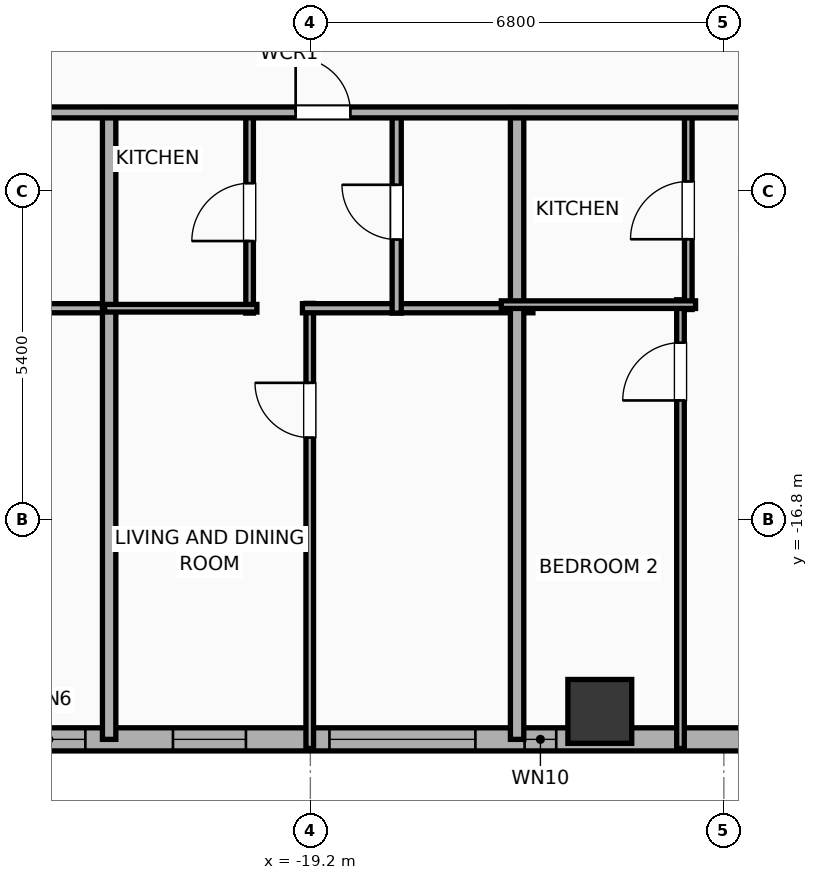
"""IFC4 building model, lengths in metres.
Left out: names, types, materials, properties, quantities, classifications, styles, units other than length and angle.
Written with IfcOpenShell. Run it as: python <this file> out.ifc"""

import sys

from ifc_helpers import new_model, si_unit, direction, frame, frame_2d, origin, origin_2d, place, context, subcontext, project, spatial, rectangle, hollow_rectangle, extrude, element, fill, save


model = new_model("IFC4")
c1 = context("Model", 3, precision=1e-05, world=origin(), true_north=direction((0.0, 1.0)))
c2 = subcontext(c1, "Body", "Model", "MODEL_VIEW")
j1 = project(units=[si_unit("LENGTHUNIT", "METRE"), si_unit("PLANEANGLEUNIT", "RADIAN")], contexts=[c1])
p1 = place(None, origin())
s1 = spatial("IfcSite", under=j1, at=p1, CompositionType="ELEMENT")
p2 = place(p1, origin())
s2 = spatial("IfcBuilding", under=s1, at=p2, CompositionType="ELEMENT")
p3 = place(p2, frame((0.0, 0.0, 101.4)))
s3 = spatial("IfcBuildingStorey", under=s2, at=p3, CompositionType="ELEMENT", Elevation=101.4)
p4 = place(p3, frame((-14.44, -19.95, 0.0), z_axis=(0.0, 0.0, 1.0), x_axis=(1.0, 0.0, 0.0)))
e1 = element("IfcColumn", 1, at=p4, inside=s3, PredefinedType="COLUMN", context=c2, shape_type="SweptSolid", body=[
    extrude(hollow_rectangle(XDim=1.05, YDim=1.05, WallThickness=0.036, at=origin_2d()), origin(), (0.0, 0.0, 1.0), 3.9),
])
p5 = place(p3, frame((29.381, -20.41, 0.0), z_axis=(0.0, 0.0, 1.0), x_axis=(-1.0, 0.0, 0.0)))
e2 = element("IfcWall", 2, at=p5, inside=s3, PredefinedType="ELEMENTEDWALL", context=c2, shape_type="SweptSolid", body=[
    extrude(rectangle(XDim=54.763, YDim=0.38, at=frame_2d((27.381, 0.0))), origin(), (0.0, 0.0, 1.0), 3.65),
])
p6 = place(p5, frame((6.495, 0.0, 0.75)))
e3 = element("IfcOpeningElement", 3, at=p6, cuts=e2, PredefinedType="OPENING", context=c2, shape_type="SweptSolid", body=[
    extrude(rectangle(XDim=2.4, YDim=2.1, at=frame_2d((1.2, 1.05))), frame((0.0, 0.2, 0.0), z_axis=(0.0, -1.0, 0.0), x_axis=(1.0, 0.0, 0.0)), (0.0, 0.0, 1.0), 0.4),
])
p7 = place(p5, frame((17.686, 0.0, 0.75)))
e4 = element("IfcOpeningElement", 4, at=p7, cuts=e2, PredefinedType="OPENING", context=c2, shape_type="SweptSolid", body=[
    extrude(rectangle(XDim=2.4, YDim=2.1, at=frame_2d((1.2, 1.05))), frame((0.0, 0.2, 0.0), z_axis=(0.0, -1.0, 0.0), x_axis=(1.0, 0.0, 0.0)), (0.0, 0.0, 1.0), 0.4),
])
p8 = place(p5, frame((34.677, 0.0, 0.75)))
e5 = element("IfcOpeningElement", 5, at=p8, cuts=e2, PredefinedType="OPENING", context=c2, shape_type="SweptSolid", body=[
    extrude(rectangle(XDim=2.4, YDim=2.1, at=frame_2d((1.2, 1.05))), frame((0.0, 0.2, 0.0), z_axis=(0.0, -1.0, 0.0), x_axis=(1.0, 0.0, 0.0)), (0.0, 0.0, 1.0), 0.4),
])
p9 = place(p5, frame((45.867, 0.0, 0.75)))
e6 = element("IfcOpeningElement", 6, at=p9, cuts=e2, PredefinedType="OPENING", context=c2, shape_type="SweptSolid", body=[
    extrude(rectangle(XDim=2.4, YDim=2.1, at=frame_2d((1.2, 1.05))), frame((0.0, 0.2, 0.0), z_axis=(0.0, -1.0, 0.0), x_axis=(1.0, 0.0, 0.0)), (0.0, 0.0, 1.0), 0.4),
])
p10 = place(p5, frame((52.281, 0.0, 0.75)))
e7 = element("IfcOpeningElement", 7, at=p10, cuts=e2, PredefinedType="OPENING", context=c2, shape_type="SweptSolid", body=[
    extrude(rectangle(XDim=1.2, YDim=2.05, at=frame_2d((0.6, 1.025))), frame((0.0, 0.2, 0.0), z_axis=(0.0, -1.0, 0.0), x_axis=(1.0, 0.0, 0.0)), (0.0, 0.0, 1.0), 0.4),
])
p11 = place(p5, frame((49.641, 0.0, 0.75)))
e8 = element("IfcOpeningElement", 8, at=p11, cuts=e2, PredefinedType="OPENING", context=c2, shape_type="SweptSolid", body=[
    extrude(rectangle(XDim=1.2, YDim=2.05, at=frame_2d((0.6, 1.025))), frame((0.0, 0.2, 0.0), z_axis=(0.0, -1.0, 0.0), x_axis=(1.0, 0.0, 0.0)), (0.0, 0.0, 1.0), 0.4),
])
p12 = place(p5, frame((39.543, 0.0, 0.75)))
e9 = element("IfcOpeningElement", 9, at=p12, cuts=e2, PredefinedType="OPENING", context=c2, shape_type="SweptSolid", body=[
    extrude(rectangle(XDim=1.2, YDim=2.05, at=frame_2d((0.6, 1.025))), frame((0.0, 0.2, 0.0), z_axis=(0.0, -1.0, 0.0), x_axis=(1.0, 0.0, 0.0)), (0.0, 0.0, 1.0), 0.4),
])
p13 = place(p5, frame((44.538, 0.0, 0.75)))
e10 = element("IfcOpeningElement", 10, at=p13, cuts=e2, PredefinedType="OPENING", context=c2, shape_type="SweptSolid", body=[
    extrude(rectangle(XDim=0.52, YDim=2.05, at=frame_2d((0.26, 1.025))), frame((0.0, 0.2, 0.0), z_axis=(0.0, -1.0, 0.0), x_axis=(1.0, 0.0, 0.0)), (0.0, 0.0, 1.0), 0.4),
])
p14 = place(p5, frame((28.206, 0.0, 0.75)))
e11 = element("IfcOpeningElement", 11, at=p14, cuts=e2, PredefinedType="OPENING", context=c2, shape_type="SweptSolid", body=[
    extrude(rectangle(XDim=1.2, YDim=2.05, at=frame_2d((0.6, 1.025))), frame((0.0, 0.2, 0.0), z_axis=(0.0, -1.0, 0.0), x_axis=(1.0, 0.0, 0.0)), (0.0, 0.0, 1.0), 0.4),
])
p15 = place(p5, frame((31.241, 0.0, 0.75)))
e12 = element("IfcOpeningElement", 12, at=p15, cuts=e2, PredefinedType="OPENING", context=c2, shape_type="SweptSolid", body=[
    extrude(rectangle(XDim=0.85, YDim=2.05, at=frame_2d((0.425, 1.025))), frame((0.0, 0.2, 0.0), z_axis=(0.0, -1.0, 0.0), x_axis=(1.0, 0.0, 0.0)), (0.0, 0.0, 1.0), 0.4),
])
p16 = place(p5, frame((24.561, 0.0, 0.75)))
e13 = element("IfcOpeningElement", 13, at=p16, cuts=e2, PredefinedType="OPENING", context=c2, shape_type="SweptSolid", body=[
    extrude(rectangle(XDim=1.2, YDim=2.05, at=frame_2d((0.6, 1.025))), frame((0.0, 0.2, 0.0), z_axis=(0.0, -1.0, 0.0), x_axis=(1.0, 0.0, 0.0)), (0.0, 0.0, 1.0), 0.4),
])
p17 = place(p5, frame((22.561, 0.0, 0.75)))
e14 = element("IfcOpeningElement", 14, at=p17, cuts=e2, PredefinedType="OPENING", context=c2, shape_type="SweptSolid", body=[
    extrude(rectangle(XDim=0.52, YDim=2.05, at=frame_2d((0.26, 1.025))), frame((0.0, 0.2, 0.0), z_axis=(0.0, -1.0, 0.0), x_axis=(1.0, 0.0, 0.0)), (0.0, 0.0, 1.0), 0.4),
])
p18 = place(p5, frame((13.886, 0.0, 0.75)))
e15 = element("IfcOpeningElement", 15, at=p18, cuts=e2, PredefinedType="OPENING", context=c2, shape_type="SweptSolid", body=[
    extrude(rectangle(XDim=1.2, YDim=2.05, at=frame_2d((0.6, 1.025))), frame((0.0, 0.2, 0.0), z_axis=(0.0, -1.0, 0.0), x_axis=(1.0, 0.0, 0.0)), (0.0, 0.0, 1.0), 0.4),
])
p19 = place(p5, frame((11.694, 0.0, 0.75)))
e16 = element("IfcOpeningElement", 16, at=p19, cuts=e2, PredefinedType="OPENING", context=c2, shape_type="SweptSolid", body=[
    extrude(rectangle(XDim=0.85, YDim=2.05, at=frame_2d((0.425, 1.025))), frame((0.0, 0.2, 0.0), z_axis=(0.0, -1.0, 0.0), x_axis=(1.0, 0.0, 0.0)), (0.0, 0.0, 1.0), 0.4),
])
p20 = place(p5, frame((3.286, 0.0, 0.75)))
e17 = element("IfcOpeningElement", 17, at=p20, cuts=e2, PredefinedType="OPENING", context=c2, shape_type="SweptSolid", body=[
    extrude(rectangle(XDim=1.2, YDim=2.05, at=frame_2d((0.6, 1.025))), frame((0.0, 0.2, 0.0), z_axis=(0.0, -1.0, 0.0), x_axis=(1.0, 0.0, 0.0)), (0.0, 0.0, 1.0), 0.4),
])
p21 = place(p5, frame((0.816, 0.0, 0.75)))
e18 = element("IfcOpeningElement", 18, at=p21, cuts=e2, PredefinedType="OPENING", context=c2, shape_type="SweptSolid", body=[
    extrude(rectangle(XDim=1.2, YDim=2.05, at=frame_2d((0.6, 1.025))), frame((0.0, 0.2, 0.0), z_axis=(0.0, -1.0, 0.0), x_axis=(1.0, 0.0, 0.0)), (0.0, 0.0, 1.0), 0.4),
])
p22 = place(p3, frame((-26.039, -13.32, 0.0), z_axis=(0.0, 0.0, 1.0), x_axis=(1.0, 0.0, 0.0)))
e19 = element("IfcWall", 19, at=p22, inside=s3, PredefinedType="PLUMBINGWALL", context=c2, shape_type="SweptSolid", body=[
    extrude(rectangle(XDim=3.605, YDim=0.15, at=frame_2d((1.802, 0.0))), origin(), (0.0, 0.0, 1.0), 3.65),
])
p23 = place(p3, frame((-22.509, -20.41, 0.0), z_axis=(0.0, 0.0, 1.0), x_axis=(0.0, 1.0, 0.0)))
e20 = element("IfcWall", 20, at=p23, inside=s3, PredefinedType="PARTITIONING", context=c2, shape_type="SweptSolid", body=[
    extrude(rectangle(XDim=10.39, YDim=0.22, at=frame_2d((5.195, 0.0))), origin(), (0.0, 0.0, 1.0), 3.65),
])
p24 = place(p3, frame((-19.21, -20.56, 0.0), z_axis=(0.0, 0.0, 1.0), x_axis=(0.0, 1.0, 0.0)))
e21 = element("IfcWall", 21, at=p24, inside=s3, PredefinedType="PARTITIONING", context=c2, shape_type="SweptSolid", body=[
    extrude(rectangle(XDim=7.32, YDim=0.125, at=frame_2d((3.66, 0.0))), origin(), (0.0, 0.0, 1.0), 3.65),
])
p25 = place(p24, frame((5.113, 0.0, 0.0)))
e22 = element("IfcOpeningElement", 22, at=p25, cuts=e21, PredefinedType="OPENING", context=c2, shape_type="SweptSolid", body=[
    extrude(rectangle(XDim=0.9, YDim=2.05, at=frame_2d((0.45, 1.025))), frame((0.0, 0.073, 0.0), z_axis=(0.0, -1.0, 0.0), x_axis=(1.0, 0.0, 0.0)), (0.0, 0.0, 1.0), 0.145),
])
p26 = place(p3, frame((-19.33, -13.32, 0.0), z_axis=(0.0, 0.0, 1.0), x_axis=(1.0, 0.0, 0.0)))
e23 = element("IfcWall", 23, at=p26, inside=s3, PredefinedType="PLUMBINGWALL", context=c2, shape_type="SweptSolid", body=[
    extrude(rectangle(XDim=3.79, YDim=0.15, at=frame_2d((1.895, 0.0))), origin(), (0.0, 0.0, 1.0), 3.65),
])
p27 = place(p3, frame((-20.199, -13.4, 0.0), z_axis=(0.0, 0.0, 1.0), x_axis=(0.0, 1.0, 0.0)))
e24 = element("IfcWall", 24, at=p27, inside=s3, PredefinedType="PARTITIONING", context=c2, shape_type="SweptSolid", body=[
    extrude(rectangle(XDim=3.32, YDim=0.125, at=frame_2d((1.66, 0.0))), origin(), (0.0, 0.0, 1.0), 3.65),
])
p28 = place(p27, frame((1.185, 0.0, 0.0)))
e25 = element("IfcOpeningElement", 25, at=p28, cuts=e24, PredefinedType="OPENING", context=c2, shape_type="SweptSolid", body=[
    extrude(rectangle(XDim=0.95, YDim=2.05, at=frame_2d((0.475, 1.025))), frame((0.0, 0.073, 0.0), z_axis=(0.0, -1.0, 0.0), x_axis=(1.0, 0.0, 0.0)), (0.0, 0.0, 1.0), 0.145),
])
p29 = place(p3, frame((-22.584, -13.32, 0.0), z_axis=(0.0, 0.0, 1.0), x_axis=(1.0, 0.0, 0.0)))
e26 = element("IfcWall", 26, at=p29, inside=s3, PredefinedType="PARTITIONING", context=c2, shape_type="SweptSolid", body=[
    extrude(rectangle(XDim=2.505, YDim=0.125, at=frame_2d((1.252, 0.0))), origin(), (0.0, 0.0, 1.0), 3.65),
])
p30 = place(p3, frame((-17.78, -13.4, 0.0), z_axis=(0.0, 0.0, 1.0), x_axis=(0.0, 1.0, 0.0)))
e27 = element("IfcWall", 27, at=p30, inside=s3, PredefinedType="PLUMBINGWALL", context=c2, shape_type="SweptSolid", body=[
    extrude(rectangle(XDim=3.32, YDim=0.15, at=frame_2d((1.66, 0.0))), origin(), (0.0, 0.0, 1.0), 3.65),
])
p31 = place(p30, frame((1.21, 0.0, 0.0)))
e28 = element("IfcOpeningElement", 28, at=p31, cuts=e27, PredefinedType="OPENING", context=c2, shape_type="SweptSolid", body=[
    extrude(rectangle(XDim=0.9, YDim=2.05, at=frame_2d((0.45, 1.025))), frame((0.0, 0.085, 0.0), z_axis=(0.0, -1.0, 0.0), x_axis=(1.0, 0.0, 0.0)), (0.0, 0.0, 1.0), 0.17),
])
p32 = place(p3, frame((-15.8, -20.41, 0.0), z_axis=(0.0, 0.0, 1.0), x_axis=(0.0, 1.0, 0.0)))
e29 = element("IfcWall", 29, at=p32, inside=s3, PredefinedType="PARTITIONING", context=c2, shape_type="SweptSolid", body=[
    extrude(rectangle(XDim=10.39, YDim=0.22, at=frame_2d((5.195, 0.0))), origin(), (0.0, 0.0, 1.0), 3.65),
])
p33 = place(p3, frame((-13.113, -20.56, 0.0), z_axis=(0.0, 0.0, 1.0), x_axis=(0.0, 1.0, 0.0)))
e30 = element("IfcWall", 30, at=p33, inside=s3, PredefinedType="PARTITIONING", context=c2, shape_type="SweptSolid", body=[
    extrude(rectangle(XDim=7.379, YDim=0.125, at=frame_2d((3.689, 0.0))), origin(), (0.0, 0.0, 1.0), 3.65),
])
p34 = place(p33, frame((5.723, 0.0, 0.0)))
e31 = element("IfcOpeningElement", 31, at=p34, cuts=e30, PredefinedType="OPENING", context=c2, shape_type="SweptSolid", body=[
    extrude(rectangle(XDim=0.95, YDim=2.05, at=frame_2d((0.475, 1.025))), frame((0.0, 0.073, 0.0), z_axis=(0.0, -1.0, 0.0), x_axis=(1.0, 0.0, 0.0)), (0.0, 0.0, 1.0), 0.145),
])
p35 = place(p3, frame((-12.985, -13.341, 0.0), z_axis=(0.0, 0.0, 1.0), x_axis=(0.0, 1.0, 0.0)))
e32 = element("IfcWall", 32, at=p35, inside=s3, PredefinedType="PARTITIONING", context=c2, shape_type="SweptSolid", body=[
    extrude(rectangle(XDim=3.261, YDim=0.125, at=frame_2d((1.63, 0.0))), origin(), (0.0, 0.0, 1.0), 3.65),
])
p36 = place(p35, frame((1.156, 0.0, 0.0)))
e33 = element("IfcOpeningElement", 33, at=p36, cuts=e32, PredefinedType="OPENING", context=c2, shape_type="SweptSolid", body=[
    extrude(rectangle(XDim=0.95, YDim=2.05, at=frame_2d((0.475, 1.025))), frame((0.0, 0.073, 0.0), z_axis=(0.0, -1.0, 0.0), x_axis=(1.0, 0.0, 0.0)), (0.0, 0.0, 1.0), 0.145),
])
p37 = place(p3, frame((-16.06, -13.261, 0.0), z_axis=(0.0, 0.0, 1.0), x_axis=(1.0, 0.0, 0.0)))
e34 = element("IfcWall", 34, at=p37, inside=s3, PredefinedType="PARTITIONING", context=c2, shape_type="SweptSolid", body=[
    extrude(rectangle(XDim=3.195, YDim=0.125, at=frame_2d((1.598, 0.0))), origin(), (0.0, 0.0, 1.0), 3.65),
])
p38 = place(p3, frame((-29.21, -10.1, 0.0), z_axis=(0.0, 0.0, 1.0), x_axis=(1.0, 0.0, 0.0)))
e35 = element("IfcWall", 35, at=p38, inside=s3, PredefinedType="PARTITIONING", context=c2, shape_type="SweptSolid", body=[
    extrude(rectangle(XDim=62.42, YDim=0.18, at=frame_2d((31.21, 0.0))), origin(), (0.0, 0.0, 1.0), 3.65),
])
p39 = place(p38, frame((3.033, 0.0, 0.0)))
e36 = element("IfcOpeningElement", 36, at=p39, cuts=e35, PredefinedType="OPENING", context=c2, shape_type="SweptSolid", body=[
    extrude(rectangle(XDim=0.9, YDim=2.05, at=frame_2d((0.45, 1.025))), frame((0.0, 0.1, 0.0), z_axis=(0.0, -1.0, 0.0), x_axis=(1.0, 0.0, 0.0)), (0.0, 0.0, 1.0), 0.2),
])
p40 = place(p38, frame((9.768, 0.0, 0.0)))
e37 = element("IfcOpeningElement", 37, at=p40, cuts=e35, PredefinedType="OPENING", context=c2, shape_type="SweptSolid", body=[
    extrude(rectangle(XDim=0.9, YDim=2.05, at=frame_2d((0.45, 1.025))), frame((0.0, 0.1, 0.0), z_axis=(0.0, -1.0, 0.0), x_axis=(1.0, 0.0, 0.0)), (0.0, 0.0, 1.0), 0.2),
])
p41 = place(p38, frame((18.65, 0.0, 0.0)))
e38 = element("IfcOpeningElement", 38, at=p41, cuts=e35, PredefinedType="OPENING", context=c2, shape_type="SweptSolid", body=[
    extrude(rectangle(XDim=1.15, YDim=2.05, at=frame_2d((0.575, 1.025))), frame((0.0, 0.1, 0.0), z_axis=(0.0, -1.0, 0.0), x_axis=(1.0, 0.0, 0.0)), (0.0, 0.0, 1.0), 0.2),
])
p42 = place(p38, frame((29.212, 0.0, 0.0)))
e39 = element("IfcOpeningElement", 39, at=p42, cuts=e35, PredefinedType="OPENING", context=c2, shape_type="SweptSolid", body=[
    extrude(rectangle(XDim=1.15, YDim=2.05, at=frame_2d((0.575, 1.025))), frame((0.0, 0.1, 0.0), z_axis=(0.0, -1.0, 0.0), x_axis=(1.0, 0.0, 0.0)), (0.0, 0.0, 1.0), 0.2),
])
p43 = place(p38, frame((40.379, 0.0, 0.0)))
e40 = element("IfcOpeningElement", 40, at=p43, cuts=e35, PredefinedType="OPENING", context=c2, shape_type="SweptSolid", body=[
    extrude(rectangle(XDim=1.15, YDim=2.05, at=frame_2d((0.575, 1.025))), frame((0.0, 0.1, 0.0), z_axis=(0.0, -1.0, 0.0), x_axis=(1.0, 0.0, 0.0)), (0.0, 0.0, 1.0), 0.2),
])
p44 = place(p38, frame((50.959, 0.0, 0.0)))
e41 = element("IfcOpeningElement", 41, at=p44, cuts=e35, PredefinedType="OPENING", context=c2, shape_type="SweptSolid", body=[
    extrude(rectangle(XDim=1.15, YDim=2.05, at=frame_2d((0.575, 1.025))), frame((0.0, 0.1, 0.0), z_axis=(0.0, -1.0, 0.0), x_axis=(1.0, 0.0, 0.0)), (0.0, 0.0, 1.0), 0.2),
])
p45 = place(p38, frame((59.117, 0.0, 0.0)))
e42 = element("IfcOpeningElement", 42, at=p45, cuts=e35, PredefinedType="OPENING", context=c2, shape_type="SweptSolid", body=[
    extrude(rectangle(XDim=0.9, YDim=2.05, at=frame_2d((0.45, 1.025))), frame((0.0, 0.1, 0.0), z_axis=(0.0, -1.0, 0.0), x_axis=(1.0, 0.0, 0.0)), (0.0, 0.0, 1.0), 0.2),
])
p46 = place(p9, origin())
e43 = element("IfcWindow", 43, at=p46, inside=s3, PartitioningType="SINGLE_PANEL", PredefinedType="WINDOW", context=c2, shape_type="SweptSolid", body=[
    extrude(rectangle(XDim=2.4, YDim=2.1, at=frame_2d((1.2, 1.05))), frame((0.0, 0.03, 0.0), z_axis=(0.0, -1.0, 0.0), x_axis=(1.0, 0.0, 0.0)), (0.0, 0.0, 1.0), 0.06),
])
fill(e6, e43)
p47 = place(p10, origin())
e44 = element("IfcWindow", 44, at=p47, inside=s3, PartitioningType="SINGLE_PANEL", PredefinedType="WINDOW", context=c2, shape_type="SweptSolid", body=[
    extrude(rectangle(XDim=1.2, YDim=2.05, at=frame_2d((0.6, 1.025))), frame((0.0, 0.03, 0.0), z_axis=(0.0, -1.0, 0.0), x_axis=(1.0, 0.0, 0.0)), (0.0, 0.0, 1.0), 0.06),
])
fill(e7, e44)
p48 = place(p11, origin())
e45 = element("IfcWindow", 45, at=p48, inside=s3, PartitioningType="SINGLE_PANEL", PredefinedType="WINDOW", context=c2, shape_type="SweptSolid", body=[
    extrude(rectangle(XDim=1.2, YDim=2.05, at=frame_2d((0.6, 1.025))), frame((0.0, 0.03, 0.0), z_axis=(0.0, -1.0, 0.0), x_axis=(1.0, 0.0, 0.0)), (0.0, 0.0, 1.0), 0.06),
])
fill(e8, e45)
p49 = place(p13, origin())
e46 = element("IfcWindow", 46, at=p49, inside=s3, PartitioningType="SINGLE_PANEL", PredefinedType="WINDOW", context=c2, shape_type="SweptSolid", body=[
    extrude(rectangle(XDim=0.52, YDim=2.05, at=frame_2d((0.26, 1.025))), frame((0.0, 0.03, 0.0), z_axis=(0.0, -1.0, 0.0), x_axis=(1.0, 0.0, 0.0)), (0.0, 0.0, 1.0), 0.06),
])
fill(e10, e46)
p50 = place(p25, origin())
e47 = element("IfcDoor", 47, at=p50, inside=s3, OperationType="SINGLE_SWING_RIGHT", PredefinedType="DOOR", context=c2, shape_type="SweptSolid", body=[
    extrude(rectangle(XDim=0.9, YDim=2.05, at=frame_2d((0.45, 1.025))), frame((0.0, 0.025, 0.0), z_axis=(0.0, -1.0, 0.0), x_axis=(1.0, 0.0, 0.0)), (0.0, 0.0, 1.0), 0.05),
])
fill(e22, e47)
p51 = place(p28, origin())
e48 = element("IfcDoor", 48, at=p51, inside=s3, OperationType="SINGLE_SWING_LEFT", PredefinedType="DOOR", context=c2, shape_type="SweptSolid", body=[
    extrude(rectangle(XDim=0.95, YDim=2.05, at=frame_2d((0.475, 1.025))), frame((0.0, 0.025, 0.0), z_axis=(0.0, -1.0, 0.0), x_axis=(1.0, 0.0, 0.0)), (0.0, 0.0, 1.0), 0.05),
])
fill(e25, e48)
p52 = place(p31, origin())
e49 = element("IfcDoor", 49, at=p52, inside=s3, OperationType="SINGLE_SWING_RIGHT", PredefinedType="DOOR", context=c2, shape_type="SweptSolid", body=[
    extrude(rectangle(XDim=0.9, YDim=2.05, at=frame_2d((0.45, 1.025))), frame((0.0, 0.025, 0.0), z_axis=(0.0, -1.0, 0.0), x_axis=(1.0, 0.0, 0.0)), (0.0, 0.0, 1.0), 0.05),
])
fill(e28, e49)
p53 = place(p34, origin())
e50 = element("IfcDoor", 50, at=p53, inside=s3, OperationType="SINGLE_SWING_LEFT", PredefinedType="DOOR", context=c2, shape_type="SweptSolid", body=[
    extrude(rectangle(XDim=0.95, YDim=2.05, at=frame_2d((0.475, 1.025))), frame((0.0, 0.025, 0.0), z_axis=(0.0, -1.0, 0.0), x_axis=(1.0, 0.0, 0.0)), (0.0, 0.0, 1.0), 0.05),
])
fill(e31, e50)
p54 = place(p36, origin())
e51 = element("IfcDoor", 51, at=p54, inside=s3, OperationType="SINGLE_SWING_LEFT", PredefinedType="DOOR", context=c2, shape_type="SweptSolid", body=[
    extrude(rectangle(XDim=0.95, YDim=2.05, at=frame_2d((0.475, 1.025))), frame((0.0, 0.025, 0.0), z_axis=(0.0, -1.0, 0.0), x_axis=(1.0, 0.0, 0.0)), (0.0, 0.0, 1.0), 0.05),
])
fill(e33, e51)
p55 = place(p40, origin())
e52 = element("IfcDoor", 52, at=p55, inside=s3, OperationType="SINGLE_SWING_LEFT", PredefinedType="DOOR", context=c2, shape_type="SweptSolid", body=[
    extrude(rectangle(XDim=0.9, YDim=2.05, at=frame_2d((0.45, 1.025))), frame((0.0, 0.025, 0.0), z_axis=(0.0, -1.0, 0.0), x_axis=(1.0, 0.0, 0.0)), (0.0, 0.0, 1.0), 0.05),
])
fill(e37, e52)
save(model, sys.argv[1])
